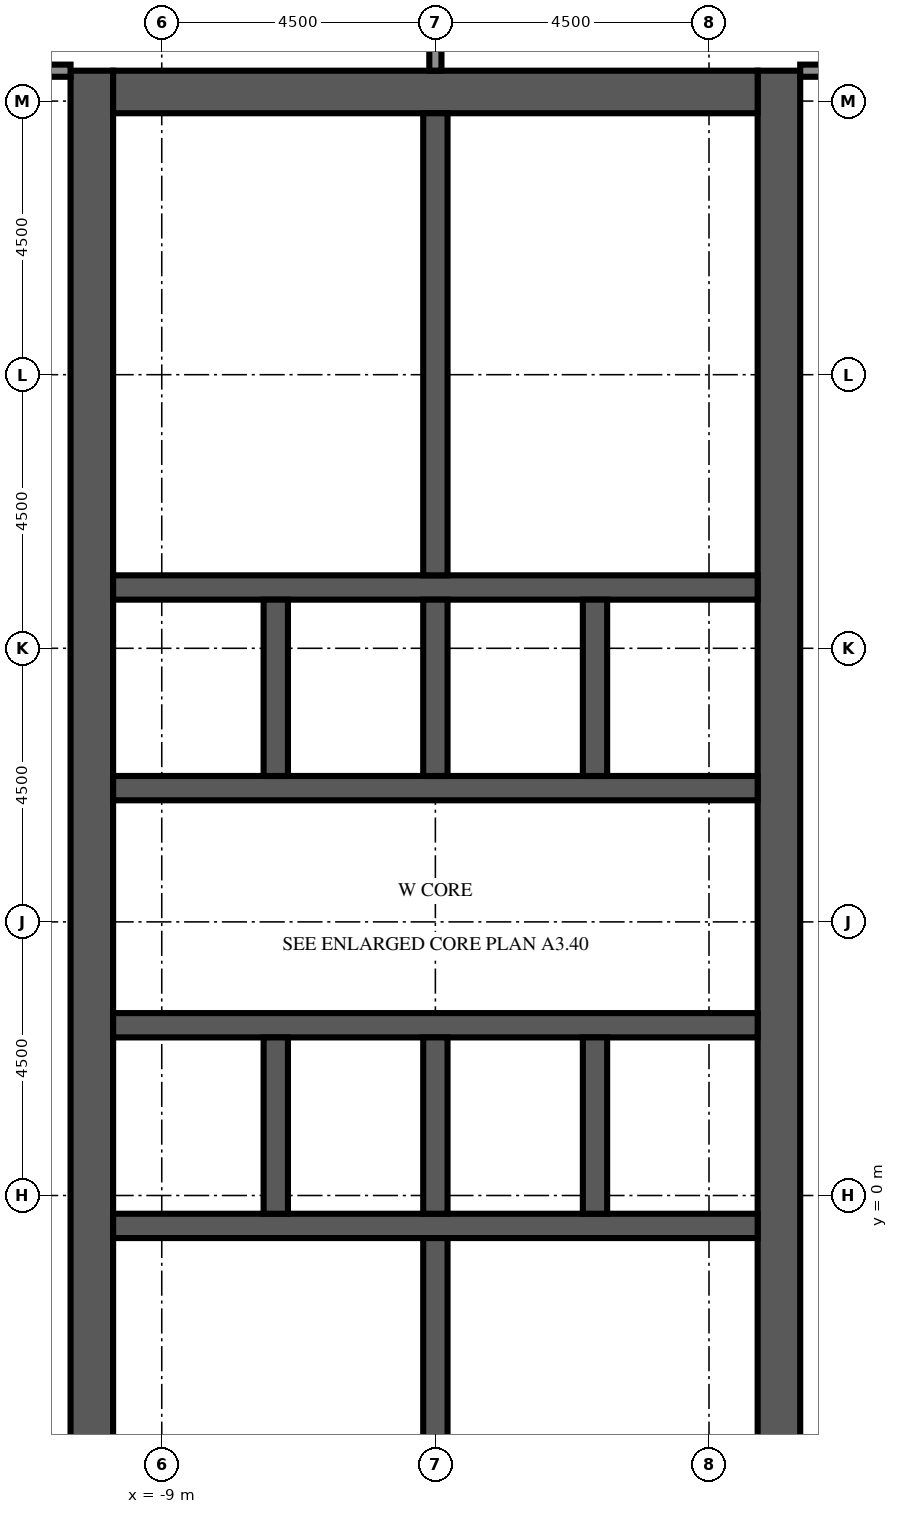
"""IFC4 building model, lengths in metres.
Left out: names, types, materials, properties, quantities, classifications, styles, units other than length and angle.
Written with IfcOpenShell. Run it as: python <this file> out.ifc"""

import sys

from ifc_helpers import new_model, si_unit, direction, frame, frame_2d, origin, place, context, subcontext, project, spatial, rectangle, extrude, element, fill, save


model = new_model("IFC4")
c1 = context("Model", 3, precision=1e-05, world=origin(), true_north=direction((0.0, 1.0)))
c2 = subcontext(c1, "Body", "Model", "MODEL_VIEW")
j1 = project(units=[si_unit("LENGTHUNIT", "METRE"), si_unit("PLANEANGLEUNIT", "RADIAN")], contexts=[c1])
p1 = place(None, origin())
s1 = spatial("IfcSite", under=j1, at=p1, CompositionType="ELEMENT")
p2 = place(p1, origin())
s2 = spatial("IfcBuilding", under=s1, at=p2, CompositionType="ELEMENT")
p3 = place(p2, frame((0.0, 0.0, 270.4)))
s3 = spatial("IfcBuildingStorey", under=s2, at=p3, CompositionType="ELEMENT", Elevation=270.4)
p4 = place(p3, frame((-10.15, -9.0, 0.0), z_axis=(0.0, 0.0, 1.0), x_axis=(0.0, 1.0, 0.0)))
e1 = element("IfcWall", 1, at=p4, inside=s3, PredefinedType="SHEAR", context=c2, shape_type="SweptSolid", body=[
    extrude(rectangle(XDim=27.5, YDim=0.7, at=frame_2d((13.75, 0.0))), origin(), (0.0, 0.0, 1.0), 4.1),
])
p5 = place(p4, frame((12.55, 0.0, 0.0)))
e2 = element("IfcOpeningElement", 2, at=p5, cuts=e1, PredefinedType="OPENING", context=c2, shape_type="SweptSolid", body=[
    extrude(rectangle(XDim=2.4, YDim=2.4, at=frame_2d((1.2, 1.2))), frame((0.0, 0.36, 0.0), z_axis=(0.0, -1.0, 0.0), x_axis=(1.0, 0.0, 0.0)), (0.0, 0.0, 1.0), 0.72),
])
p6 = place(p4, frame((6.825, 0.0, 0.0)))
e3 = element("IfcOpeningElement", 3, at=p6, cuts=e1, PredefinedType="OPENING", context=c2, shape_type="SweptSolid", body=[
    extrude(rectangle(XDim=1.2, YDim=2.1, at=frame_2d((0.6, 1.05))), frame((0.0, 0.36, 0.0), z_axis=(0.0, -1.0, 0.0), x_axis=(1.0, 0.0, 0.0)), (0.0, 0.0, 1.0), 0.72),
])
p7 = place(p4, frame((19.475, 0.0, 0.0)))
e4 = element("IfcOpeningElement", 4, at=p7, cuts=e1, PredefinedType="OPENING", context=c2, shape_type="SweptSolid", body=[
    extrude(rectangle(XDim=1.2, YDim=2.1, at=frame_2d((0.6, 1.05))), frame((0.0, 0.36, 0.0), z_axis=(0.0, -1.0, 0.0), x_axis=(1.0, 0.0, 0.0)), (0.0, 0.0, 1.0), 0.72),
])
p8 = place(p3, frame((1.15, -9.0, 0.0), z_axis=(0.0, 0.0, 1.0), x_axis=(0.0, 1.0, 0.0)))
e5 = element("IfcWall", 5, at=p8, inside=s3, PredefinedType="SHEAR", context=c2, shape_type="SweptSolid", body=[
    extrude(rectangle(XDim=27.5, YDim=0.7, at=frame_2d((13.75, 0.0))), origin(), (0.0, 0.0, 1.0), 4.1),
])
p9 = place(p8, frame((12.55, 0.0, 0.0)))
e6 = element("IfcOpeningElement", 6, at=p9, cuts=e5, PredefinedType="OPENING", context=c2, shape_type="SweptSolid", body=[
    extrude(rectangle(XDim=2.4, YDim=2.4, at=frame_2d((1.2, 1.2))), frame((0.0, 0.36, 0.0), z_axis=(0.0, -1.0, 0.0), x_axis=(1.0, 0.0, 0.0)), (0.0, 0.0, 1.0), 0.72),
])
p10 = place(p8, frame((3.9, 0.0, 0.0)))
e7 = element("IfcOpeningElement", 7, at=p10, cuts=e5, PredefinedType="OPENING", context=c2, shape_type="SweptSolid", body=[
    extrude(rectangle(XDim=1.2, YDim=2.1, at=frame_2d((0.6, 1.05))), frame((0.0, 0.36, 0.0), z_axis=(0.0, -1.0, 0.0), x_axis=(1.0, 0.0, 0.0)), (0.0, 0.0, 1.0), 0.72),
])
p11 = place(p8, frame((19.46, 0.0, 0.0)))
e8 = element("IfcOpeningElement", 8, at=p11, cuts=e5, PredefinedType="OPENING", context=c2, shape_type="SweptSolid", body=[
    extrude(rectangle(XDim=1.0, YDim=2.1, at=frame_2d((0.5, 1.05))), frame((0.0, 0.36, 0.0), z_axis=(0.0, -1.0, 0.0), x_axis=(1.0, 0.0, 0.0)), (0.0, 0.0, 1.0), 0.72),
])
p12 = place(p8, frame((21.17, 0.0, 0.0)))
e9 = element("IfcOpeningElement", 9, at=p12, cuts=e5, PredefinedType="OPENING", context=c2, shape_type="SweptSolid", body=[
    extrude(rectangle(XDim=1.0, YDim=2.1, at=frame_2d((0.5, 1.05))), frame((0.0, 0.36, 0.0), z_axis=(0.0, -1.0, 0.0), x_axis=(1.0, 0.0, 0.0)), (0.0, 0.0, 1.0), 0.72),
])
p13 = place(p8, frame((23.26, 0.0, 0.0)))
e10 = element("IfcOpeningElement", 10, at=p13, cuts=e5, PredefinedType="OPENING", context=c2, shape_type="SweptSolid", body=[
    extrude(rectangle(XDim=1.0, YDim=2.1, at=frame_2d((0.5, 1.05))), frame((0.0, 0.36, 0.0), z_axis=(0.0, -1.0, 0.0), x_axis=(1.0, 0.0, 0.0)), (0.0, 0.0, 1.0), 0.72),
])
p14 = place(p8, frame((25.35, 0.0, 0.0)))
e11 = element("IfcOpeningElement", 11, at=p14, cuts=e5, PredefinedType="OPENING", context=c2, shape_type="SweptSolid", body=[
    extrude(rectangle(XDim=1.0, YDim=2.1, at=frame_2d((0.5, 1.05))), frame((0.0, 0.36, 0.0), z_axis=(0.0, -1.0, 0.0), x_axis=(1.0, 0.0, 0.0)), (0.0, 0.0, 1.0), 0.72),
])
p15 = place(p3, frame((-9.8, 18.15, 0.0), z_axis=(0.0, 0.0, 1.0), x_axis=(1.0, 0.0, 0.0)))
e12 = element("IfcWall", 12, at=p15, inside=s3, PredefinedType="SHEAR", context=c2, shape_type="SweptSolid", body=[
    extrude(rectangle(XDim=10.6, YDim=0.7, at=frame_2d((5.3, 0.0))), origin(), (0.0, 0.0, 1.0), 4.1),
])
p16 = place(p3, frame((-9.8, -0.5, 0.0), z_axis=(0.0, 0.0, 1.0), x_axis=(1.0, 0.0, 0.0)))
e13 = element("IfcWall", 13, at=p16, inside=s3, PredefinedType="SHEAR", context=c2, shape_type="SweptSolid", body=[
    extrude(rectangle(XDim=10.6, YDim=0.4, at=frame_2d((5.3, 0.0))), origin(), (0.0, 0.0, 1.0), 4.1),
])
p17 = place(p3, frame((-9.8, 2.8, 0.0), z_axis=(0.0, 0.0, 1.0), x_axis=(1.0, 0.0, 0.0)))
e14 = element("IfcWall", 14, at=p17, inside=s3, PredefinedType="SHEAR", context=c2, shape_type="SweptSolid", body=[
    extrude(rectangle(XDim=10.6, YDim=0.4, at=frame_2d((5.3, 0.0))), origin(), (0.0, 0.0, 1.0), 4.1),
])
p18 = place(p17, frame((0.688, 0.0, 0.0)))
e15 = element("IfcOpeningElement", 15, at=p18, cuts=e14, PredefinedType="OPENING", context=c2, shape_type="SweptSolid", body=[
    extrude(rectangle(XDim=1.1, YDim=2.1, at=frame_2d((0.55, 1.05))), frame((0.0, 0.21, 0.0), z_axis=(0.0, -1.0, 0.0), x_axis=(1.0, 0.0, 0.0)), (0.0, 0.0, 1.0), 0.42),
])
p19 = place(p17, frame((3.438, 0.0, 0.0)))
e16 = element("IfcOpeningElement", 16, at=p19, cuts=e14, PredefinedType="OPENING", context=c2, shape_type="SweptSolid", body=[
    extrude(rectangle(XDim=1.1, YDim=2.1, at=frame_2d((0.55, 1.05))), frame((0.0, 0.21, 0.0), z_axis=(0.0, -1.0, 0.0), x_axis=(1.0, 0.0, 0.0)), (0.0, 0.0, 1.0), 0.42),
])
p20 = place(p17, frame((6.113, 0.0, 0.0)))
e17 = element("IfcOpeningElement", 17, at=p20, cuts=e14, PredefinedType="OPENING", context=c2, shape_type="SweptSolid", body=[
    extrude(rectangle(XDim=1.0, YDim=2.1, at=frame_2d((0.5, 1.05))), frame((0.0, 0.21, 0.0), z_axis=(0.0, -1.0, 0.0), x_axis=(1.0, 0.0, 0.0)), (0.0, 0.0, 1.0), 0.42),
])
p21 = place(p17, frame((8.863, 0.0, 0.0)))
e18 = element("IfcOpeningElement", 18, at=p21, cuts=e14, PredefinedType="OPENING", context=c2, shape_type="SweptSolid", body=[
    extrude(rectangle(XDim=1.0, YDim=2.1, at=frame_2d((0.5, 1.05))), frame((0.0, 0.21, 0.0), z_axis=(0.0, -1.0, 0.0), x_axis=(1.0, 0.0, 0.0)), (0.0, 0.0, 1.0), 0.42),
])
p22 = place(p3, frame((-9.8, 6.7, 0.0), z_axis=(0.0, 0.0, 1.0), x_axis=(1.0, 0.0, 0.0)))
e19 = element("IfcWall", 19, at=p22, inside=s3, PredefinedType="SHEAR", context=c2, shape_type="SweptSolid", body=[
    extrude(rectangle(XDim=10.6, YDim=0.4, at=frame_2d((5.3, 0.0))), origin(), (0.0, 0.0, 1.0), 4.1),
])
p23 = place(p22, frame((3.438, 0.0, 0.0)))
e20 = element("IfcOpeningElement", 20, at=p23, cuts=e19, PredefinedType="OPENING", context=c2, shape_type="SweptSolid", body=[
    extrude(rectangle(XDim=1.1, YDim=2.1, at=frame_2d((0.55, 1.05))), frame((0.0, 0.21, 0.0), z_axis=(0.0, -1.0, 0.0), x_axis=(1.0, 0.0, 0.0)), (0.0, 0.0, 1.0), 0.42),
])
p24 = place(p22, frame((6.062, 0.0, 0.0)))
e21 = element("IfcOpeningElement", 21, at=p24, cuts=e19, PredefinedType="OPENING", context=c2, shape_type="SweptSolid", body=[
    extrude(rectangle(XDim=1.1, YDim=2.1, at=frame_2d((0.55, 1.05))), frame((0.0, 0.21, 0.0), z_axis=(0.0, -1.0, 0.0), x_axis=(1.0, 0.0, 0.0)), (0.0, 0.0, 1.0), 0.42),
])
p25 = place(p22, frame((8.812, 0.0, 0.0)))
e22 = element("IfcOpeningElement", 22, at=p25, cuts=e19, PredefinedType="OPENING", context=c2, shape_type="SweptSolid", body=[
    extrude(rectangle(XDim=1.1, YDim=2.1, at=frame_2d((0.55, 1.05))), frame((0.0, 0.21, 0.0), z_axis=(0.0, -1.0, 0.0), x_axis=(1.0, 0.0, 0.0)), (0.0, 0.0, 1.0), 0.42),
])
p26 = place(p22, frame((0.738, 0.0, 0.0)))
e23 = element("IfcOpeningElement", 23, at=p26, cuts=e19, PredefinedType="OPENING", context=c2, shape_type="SweptSolid", body=[
    extrude(rectangle(XDim=1.0, YDim=2.1, at=frame_2d((0.5, 1.05))), frame((0.0, 0.21, 0.0), z_axis=(0.0, -1.0, 0.0), x_axis=(1.0, 0.0, 0.0)), (0.0, 0.0, 1.0), 0.42),
])
p27 = place(p3, frame((-9.8, 10.0, 0.0), z_axis=(0.0, 0.0, 1.0), x_axis=(1.0, 0.0, 0.0)))
e24 = element("IfcWall", 24, at=p27, inside=s3, PredefinedType="SHEAR", context=c2, shape_type="SweptSolid", body=[
    extrude(rectangle(XDim=10.6, YDim=0.4, at=frame_2d((5.3, 0.0))), origin(), (0.0, 0.0, 1.0), 4.1),
])
for number, where, z_axis, x_axis in (
    (25, (-7.125, -0.3, 0.0), (0.0, 0.0, 1.0), (0.0, 1.0, 0.0)),
    (26, (-7.125, 6.9, 0.0), (0.0, 0.0, 1.0), (0.0, 1.0, 0.0)),
    (27, (-4.5, -0.3, 0.0), (0.0, 0.0, 1.0), (0.0, 1.0, 0.0)),
    (28, (-4.5, 6.9, 0.0), (0.0, 0.0, 1.0), (0.0, 1.0, 0.0)),
    (29, (-1.875, -0.3, 0.0), (0.0, 0.0, 1.0), (0.0, 1.0, 0.0)),
    (30, (-1.875, 6.9, 0.0), (0.0, 0.0, 1.0), (0.0, 1.0, 0.0)),
):
    element("IfcWall", number, at=place(p3, frame(where, z_axis=z_axis, x_axis=x_axis)), inside=s3, PredefinedType="SHEAR", context=c2, shape_type="SweptSolid", body=[
        extrude(rectangle(XDim=2.9, YDim=0.4, at=frame_2d((1.45, 0.0))), origin(), (0.0, 0.0, 1.0), 4.1),
    ])
for number, where, z_axis, x_axis in (
    (31, (-4.5, -8.3, 0.0), (0.0, 0.0, 1.0), (0.0, 1.0, 0.0)),
    (32, (-4.5, 10.2, 0.0), (0.0, 0.0, 1.0), (0.0, 1.0, 0.0)),
):
    element("IfcWall", number, at=place(p3, frame(where, z_axis=z_axis, x_axis=x_axis)), inside=s3, PredefinedType="SHEAR", context=c2, shape_type="SweptSolid", body=[
        extrude(rectangle(XDim=7.6, YDim=0.4, at=frame_2d((3.8, 0.0))), origin(), (0.0, 0.0, 1.0), 4.1),
    ])
p28 = place(p3, frame((-0.8, -2.98, 0.0), z_axis=(0.0, 0.0, 1.0), x_axis=(1.0, 0.0, 0.0)))
e33 = element("IfcWall", 33, at=p28, inside=s3, PredefinedType="PARTITIONING", context=c2, shape_type="SweptSolid", body=[
    extrude(rectangle(XDim=1.6, YDim=0.1, at=frame_2d((0.8, 0.0))), origin(), (0.0, 0.0, 1.0), 3.65),
])
p29 = place(p28, frame((0.3, 0.0, 0.0)))
e34 = element("IfcOpeningElement", 34, at=p29, cuts=e33, PredefinedType="OPENING", context=c2, shape_type="SweptSolid", body=[
    extrude(rectangle(XDim=1.0, YDim=2.1, at=frame_2d((0.5, 1.05))), frame((0.0, 0.06, 0.0), z_axis=(0.0, -1.0, 0.0), x_axis=(1.0, 0.0, 0.0)), (0.0, 0.0, 1.0), 0.12),
])
p30 = place(p3, frame((-0.8, -6.02, 0.0), z_axis=(0.0, 0.0, 1.0), x_axis=(0.0, 1.0, 0.0)))
e35 = element("IfcWall", 35, at=p30, inside=s3, PredefinedType="PARTITIONING", context=c2, shape_type="SweptSolid", body=[
    extrude(rectangle(XDim=3.04, YDim=0.1, at=frame_2d((1.52, 0.0))), origin(), (0.0, 0.0, 1.0), 3.65),
])
p31 = place(p30, frame((1.02, 0.0, 0.0)))
e36 = element("IfcOpeningElement", 36, at=p31, cuts=e35, PredefinedType="OPENING", context=c2, shape_type="SweptSolid", body=[
    extrude(rectangle(XDim=1.0, YDim=2.1, at=frame_2d((0.5, 1.05))), frame((0.0, 0.06, 0.0), z_axis=(0.0, -1.0, 0.0), x_axis=(1.0, 0.0, 0.0)), (0.0, 0.0, 1.0), 0.12),
])
p32 = place(p3, frame((-4.3, -2.98, 0.0), z_axis=(0.0, 0.0, 1.0), x_axis=(1.0, 0.0, 0.0)))
e37 = element("IfcWall", 37, at=p32, inside=s3, PredefinedType="PARTITIONING", context=c2, shape_type="SweptSolid", body=[
    extrude(rectangle(XDim=3.5, YDim=0.1, at=frame_2d((1.75, 0.0))), origin(), (0.0, 0.0, 1.0), 3.65),
])
for number, where, z_axis, x_axis in (
    (38, (-4.3, 11.72, 0.0), (0.0, 0.0, 1.0), (1.0, 0.0, 0.0)),
    (39, (-4.3, 13.62, 0.0), (0.0, 0.0, 1.0), (1.0, 0.0, 0.0)),
    (40, (-4.3, 15.9, 0.0), (0.0, 0.0, 1.0), (1.0, 0.0, 0.0)),
):
    element("IfcWall", number, at=place(p3, frame(where, z_axis=z_axis, x_axis=x_axis)), inside=s3, PredefinedType="PARTITIONING", context=c2, shape_type="SweptSolid", body=[
        extrude(rectangle(XDim=5.1, YDim=0.1, at=frame_2d((2.55, 0.0))), origin(), (0.0, 0.0, 1.0), 3.65),
    ])
p33 = place(p3, frame((-4.5, 18.5, 0.0), z_axis=(0.0, 0.0, 1.0), x_axis=(0.0, 1.0, 0.0)))
e41 = element("IfcWall", 41, at=p33, inside=s3, PredefinedType="PARTITIONING", context=c2, shape_type="SweptSolid", body=[
    extrude(rectangle(XDim=8.1, YDim=0.2, at=frame_2d((4.05, 0.0))), origin(), (0.0, 0.0, 1.0), 3.65),
])
p34 = place(p3, frame((-13.5, 18.5, 0.0), z_axis=(0.0, 0.0, 1.0), x_axis=(1.0, 0.0, 0.0)))
e42 = element("IfcWall", 42, at=p34, inside=s3, PredefinedType="PARTITIONING", context=c2, shape_type="SweptSolid", body=[
    extrude(rectangle(XDim=3.0, YDim=0.2, at=frame_2d((1.5, 0.0))), origin(), (0.0, 0.0, 1.0), 3.65),
])
p35 = place(p34, frame((0.85, 0.0, 0.0)))
e43 = element("IfcOpeningElement", 43, at=p35, cuts=e42, PredefinedType="OPENING", context=c2, shape_type="SweptSolid", body=[
    extrude(rectangle(XDim=1.0, YDim=2.1, at=frame_2d((0.5, 1.05))), frame((0.0, 0.11, 0.0), z_axis=(0.0, -1.0, 0.0), x_axis=(1.0, 0.0, 0.0)), (0.0, 0.0, 1.0), 0.22),
])
p36 = place(p3, frame((1.5, 18.5, 0.0), z_axis=(0.0, 0.0, 1.0), x_axis=(1.0, 0.0, 0.0)))
e44 = element("IfcWall", 44, at=p36, inside=s3, PredefinedType="PARTITIONING", context=c2, shape_type="SweptSolid", body=[
    extrude(rectangle(XDim=4.5, YDim=0.2, at=frame_2d((2.25, 0.0))), origin(), (0.0, 0.0, 1.0), 3.65),
])
p37 = place(p36, frame((1.1, 0.0, 0.0)))
e45 = element("IfcOpeningElement", 45, at=p37, cuts=e44, PredefinedType="OPENING", context=c2, shape_type="SweptSolid", body=[
    extrude(rectangle(XDim=1.0, YDim=2.1, at=frame_2d((0.5, 1.05))), frame((0.0, 0.11, 0.0), z_axis=(0.0, -1.0, 0.0), x_axis=(1.0, 0.0, 0.0)), (0.0, 0.0, 1.0), 0.22),
])
p38 = place(p18, origin())
e46 = element("IfcDoor", 46, at=p38, inside=s3, OperationType="DOUBLE_DOOR_SLIDING", PredefinedType="DOOR", context=c2, shape_type="SweptSolid", body=[
    extrude(rectangle(XDim=1.1, YDim=2.1, at=frame_2d((0.55, 1.05))), frame((0.0, 0.025, 0.0), z_axis=(0.0, -1.0, 0.0), x_axis=(1.0, 0.0, 0.0)), (0.0, 0.0, 1.0), 0.05),
])
fill(e15, e46)
p39 = place(p19, origin())
e47 = element("IfcDoor", 47, at=p39, inside=s3, OperationType="DOUBLE_DOOR_SLIDING", PredefinedType="DOOR", context=c2, shape_type="SweptSolid", body=[
    extrude(rectangle(XDim=1.1, YDim=2.1, at=frame_2d((0.55, 1.05))), frame((0.0, 0.025, 0.0), z_axis=(0.0, -1.0, 0.0), x_axis=(1.0, 0.0, 0.0)), (0.0, 0.0, 1.0), 0.05),
])
fill(e16, e47)
p40 = place(p23, origin())
e48 = element("IfcDoor", 48, at=p40, inside=s3, OperationType="DOUBLE_DOOR_SLIDING", PredefinedType="DOOR", context=c2, shape_type="SweptSolid", body=[
    extrude(rectangle(XDim=1.1, YDim=2.1, at=frame_2d((0.55, 1.05))), frame((0.0, 0.025, 0.0), z_axis=(0.0, -1.0, 0.0), x_axis=(1.0, 0.0, 0.0)), (0.0, 0.0, 1.0), 0.05),
])
fill(e20, e48)
p41 = place(p24, origin())
e49 = element("IfcDoor", 49, at=p41, inside=s3, OperationType="DOUBLE_DOOR_SLIDING", PredefinedType="DOOR", context=c2, shape_type="SweptSolid", body=[
    extrude(rectangle(XDim=1.1, YDim=2.1, at=frame_2d((0.55, 1.05))), frame((0.0, 0.025, 0.0), z_axis=(0.0, -1.0, 0.0), x_axis=(1.0, 0.0, 0.0)), (0.0, 0.0, 1.0), 0.05),
])
fill(e21, e49)
p42 = place(p25, origin())
e50 = element("IfcDoor", 50, at=p42, inside=s3, OperationType="DOUBLE_DOOR_SLIDING", PredefinedType="DOOR", context=c2, shape_type="SweptSolid", body=[
    extrude(rectangle(XDim=1.1, YDim=2.1, at=frame_2d((0.55, 1.05))), frame((0.0, 0.025, 0.0), z_axis=(0.0, -1.0, 0.0), x_axis=(1.0, 0.0, 0.0)), (0.0, 0.0, 1.0), 0.05),
])
fill(e22, e50)
p43 = place(p5, origin())
e51 = element("IfcDoor", 51, at=p43, inside=s3, OperationType="DOUBLE_DOOR_DOUBLE_SWING", PredefinedType="DOOR", context=c2, shape_type="SweptSolid", body=[
    extrude(rectangle(XDim=2.4, YDim=2.4, at=frame_2d((1.2, 1.2))), frame((0.0, 0.025, 0.0), z_axis=(0.0, -1.0, 0.0), x_axis=(1.0, 0.0, 0.0)), (0.0, 0.0, 1.0), 0.05),
])
fill(e2, e51)
p44 = place(p9, origin())
e52 = element("IfcDoor", 52, at=p44, inside=s3, OperationType="DOUBLE_DOOR_DOUBLE_SWING", PredefinedType="DOOR", context=c2, shape_type="SweptSolid", body=[
    extrude(rectangle(XDim=2.4, YDim=2.4, at=frame_2d((1.2, 1.2))), frame((0.0, 0.025, 0.0), z_axis=(0.0, -1.0, 0.0), x_axis=(1.0, 0.0, 0.0)), (0.0, 0.0, 1.0), 0.05),
])
fill(e6, e52)
p45 = place(p6, origin())
e53 = element("IfcDoor", 53, at=p45, inside=s3, OperationType="SINGLE_SWING_LEFT", PredefinedType="DOOR", context=c2, shape_type="SweptSolid", body=[
    extrude(rectangle(XDim=1.2, YDim=2.1, at=frame_2d((0.6, 1.05))), frame((0.0, 0.025, 0.0), z_axis=(0.0, -1.0, 0.0), x_axis=(1.0, 0.0, 0.0)), (0.0, 0.0, 1.0), 0.05),
])
fill(e3, e53)
p46 = place(p7, origin())
e54 = element("IfcDoor", 54, at=p46, inside=s3, OperationType="SINGLE_SWING_LEFT", PredefinedType="DOOR", context=c2, shape_type="SweptSolid", body=[
    extrude(rectangle(XDim=1.2, YDim=2.1, at=frame_2d((0.6, 1.05))), frame((0.0, 0.025, 0.0), z_axis=(0.0, -1.0, 0.0), x_axis=(1.0, 0.0, 0.0)), (0.0, 0.0, 1.0), 0.05),
])
fill(e4, e54)
p47 = place(p20, origin())
e55 = element("IfcDoor", 55, at=p47, inside=s3, OperationType="SINGLE_SWING_LEFT", PredefinedType="DOOR", context=c2, shape_type="SweptSolid", body=[
    extrude(rectangle(XDim=1.0, YDim=2.1, at=frame_2d((0.5, 1.05))), frame((0.0, 0.025, 0.0), z_axis=(0.0, -1.0, 0.0), x_axis=(1.0, 0.0, 0.0)), (0.0, 0.0, 1.0), 0.05),
])
fill(e17, e55)
p48 = place(p21, origin())
e56 = element("IfcDoor", 56, at=p48, inside=s3, OperationType="SINGLE_SWING_RIGHT", PredefinedType="DOOR", context=c2, shape_type="SweptSolid", body=[
    extrude(rectangle(XDim=1.0, YDim=2.1, at=frame_2d((0.5, 1.05))), frame((0.0, 0.025, 0.0), z_axis=(0.0, -1.0, 0.0), x_axis=(1.0, 0.0, 0.0)), (0.0, 0.0, 1.0), 0.05),
])
fill(e18, e56)
p49 = place(p26, origin())
e57 = element("IfcDoor", 57, at=p49, inside=s3, OperationType="SINGLE_SWING_LEFT", PredefinedType="DOOR", context=c2, shape_type="SweptSolid", body=[
    extrude(rectangle(XDim=1.0, YDim=2.1, at=frame_2d((0.5, 1.05))), frame((0.0, 0.025, 0.0), z_axis=(0.0, -1.0, 0.0), x_axis=(1.0, 0.0, 0.0)), (0.0, 0.0, 1.0), 0.05),
])
fill(e23, e57)
p50 = place(p10, origin())
e58 = element("IfcDoor", 58, at=p50, inside=s3, OperationType="SINGLE_SWING_LEFT", PredefinedType="DOOR", context=c2, shape_type="SweptSolid", body=[
    extrude(rectangle(XDim=1.2, YDim=2.1, at=frame_2d((0.6, 1.05))), frame((0.0, 0.325, 0.0), z_axis=(0.0, -1.0, 0.0), x_axis=(1.0, 0.0, 0.0)), (0.0, 0.0, 1.0), 0.05),
])
fill(e7, e58)
p51 = place(p29, origin())
e59 = element("IfcDoor", 59, at=p51, inside=s3, OperationType="SINGLE_SWING_LEFT", PredefinedType="DOOR", context=c2, shape_type="SweptSolid", body=[
    extrude(rectangle(XDim=1.0, YDim=2.1, at=frame_2d((0.5, 1.05))), frame((0.0, 0.025, 0.0), z_axis=(0.0, -1.0, 0.0), x_axis=(1.0, 0.0, 0.0)), (0.0, 0.0, 1.0), 0.05),
])
fill(e34, e59)
p52 = place(p11, origin())
e60 = element("IfcDoor", 60, at=p52, inside=s3, OperationType="SINGLE_SWING_LEFT", PredefinedType="DOOR", context=c2, shape_type="SweptSolid", body=[
    extrude(rectangle(XDim=1.0, YDim=2.1, at=frame_2d((0.5, 1.05))), frame((0.0, 0.325, 0.0), z_axis=(0.0, -1.0, 0.0), x_axis=(1.0, 0.0, 0.0)), (0.0, 0.0, 1.0), 0.05),
])
fill(e8, e60)
p53 = place(p12, origin())
e61 = element("IfcDoor", 61, at=p53, inside=s3, OperationType="SINGLE_SWING_RIGHT", PredefinedType="DOOR", context=c2, shape_type="SweptSolid", body=[
    extrude(rectangle(XDim=1.0, YDim=2.1, at=frame_2d((0.5, 1.05))), frame((0.0, 0.325, 0.0), z_axis=(0.0, -1.0, 0.0), x_axis=(1.0, 0.0, 0.0)), (0.0, 0.0, 1.0), 0.05),
])
fill(e9, e61)
p54 = place(p13, origin())
e62 = element("IfcDoor", 62, at=p54, inside=s3, OperationType="SINGLE_SWING_LEFT", PredefinedType="DOOR", context=c2, shape_type="SweptSolid", body=[
    extrude(rectangle(XDim=1.0, YDim=2.1, at=frame_2d((0.5, 1.05))), frame((0.0, 0.325, 0.0), z_axis=(0.0, -1.0, 0.0), x_axis=(1.0, 0.0, 0.0)), (0.0, 0.0, 1.0), 0.05),
])
fill(e10, e62)
p55 = place(p14, origin())
e63 = element("IfcDoor", 63, at=p55, inside=s3, OperationType="SINGLE_SWING_RIGHT", PredefinedType="DOOR", context=c2, shape_type="SweptSolid", body=[
    extrude(rectangle(XDim=1.0, YDim=2.1, at=frame_2d((0.5, 1.05))), frame((0.0, 0.325, 0.0), z_axis=(0.0, -1.0, 0.0), x_axis=(1.0, 0.0, 0.0)), (0.0, 0.0, 1.0), 0.05),
])
fill(e11, e63)
save(model, sys.argv[1])
